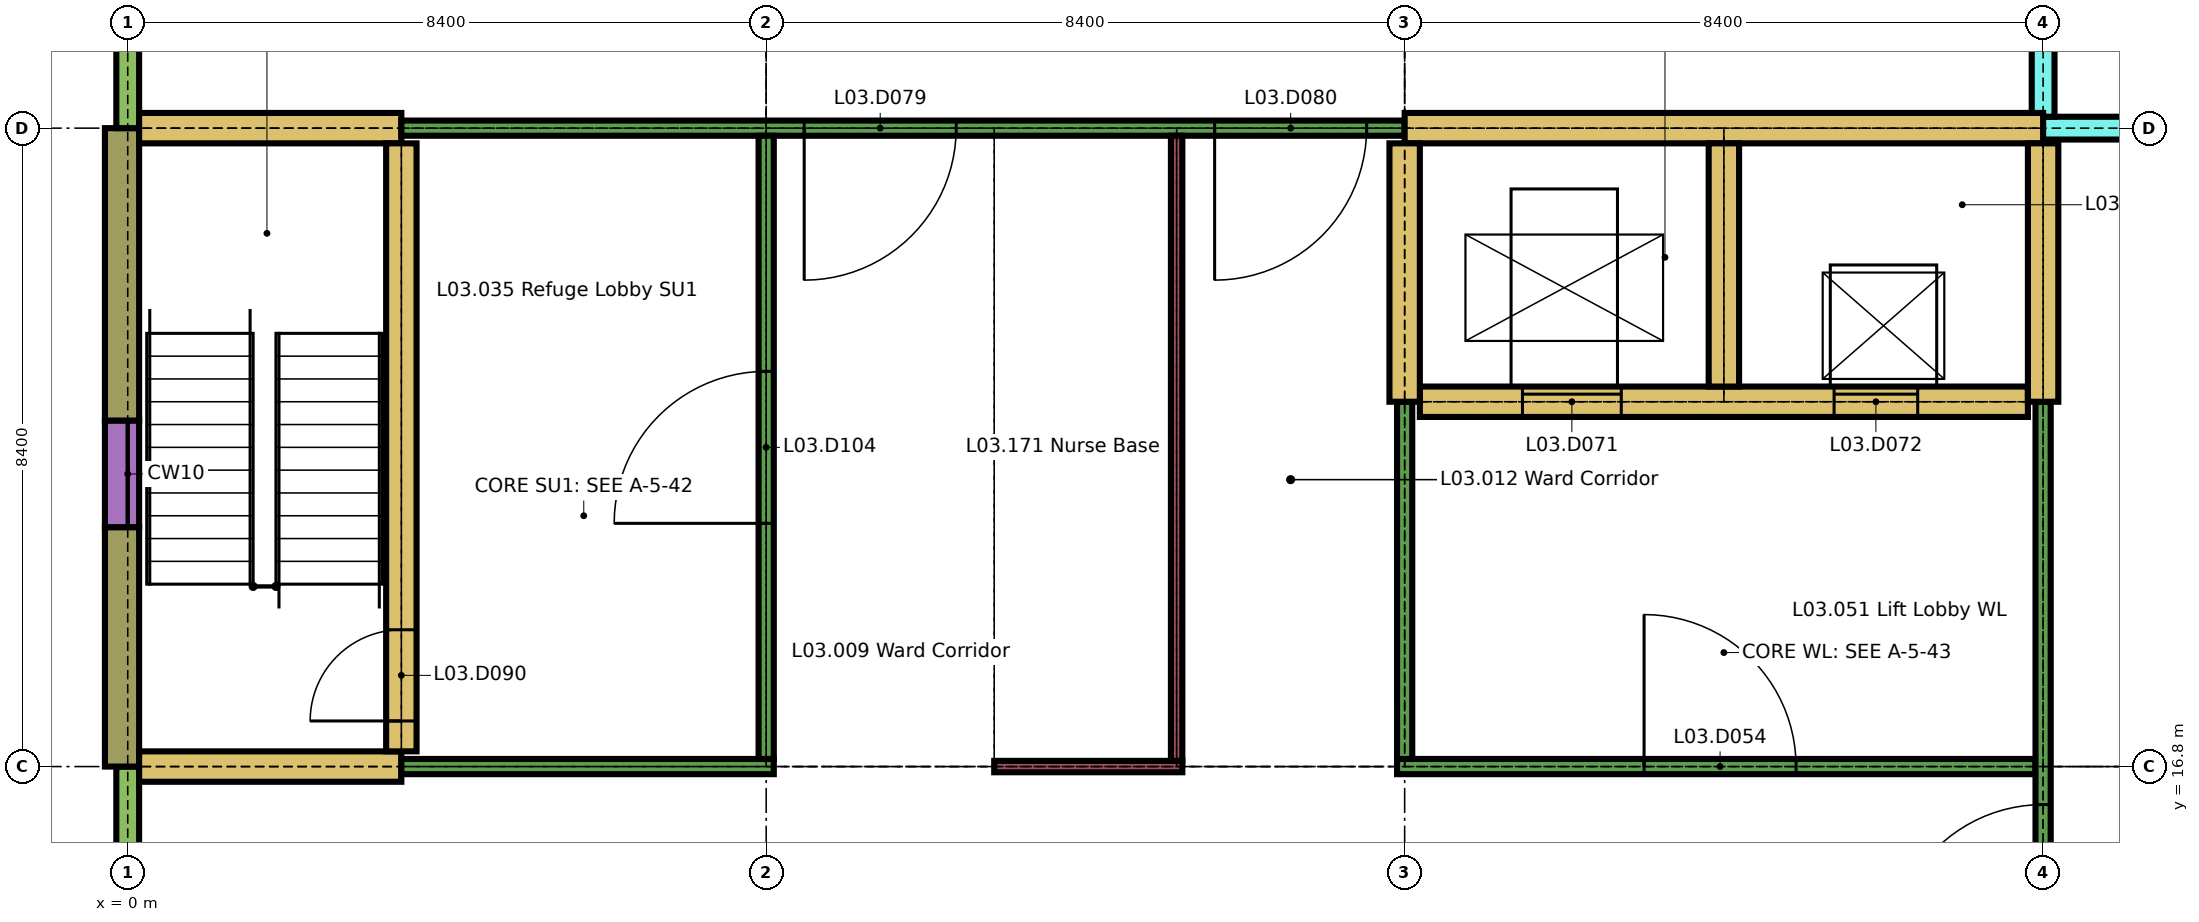
"""IFC4 building model, lengths in metres.
Left out: names, types, materials, properties, quantities, classifications, styles, units other than length and angle.
Written with IfcOpenShell. Run it as: python <this file> out.ifc"""

import sys

from ifc_helpers import new_model, si_unit, direction, frame, frame_2d, origin, place, context, subcontext, project, spatial, rectangle, extrude, element, fill, save


model = new_model("IFC4")
c1 = context("Model", 3, precision=1e-05, world=origin(), true_north=direction((0.0, 1.0)))
c2 = subcontext(c1, "Body", "Model", "MODEL_VIEW")
j1 = project(units=[si_unit("LENGTHUNIT", "METRE"), si_unit("PLANEANGLEUNIT", "RADIAN")], contexts=[c1])
p1 = place(None, origin())
s1 = spatial("IfcSite", under=j1, at=p1, CompositionType="ELEMENT")
p2 = place(p1, origin())
s2 = spatial("IfcBuilding", under=s1, at=p2, CompositionType="ELEMENT")
p3 = place(p2, frame((0.0, 0.0, 15.3)))
s3 = spatial("IfcBuildingStorey", under=s2, at=p3, CompositionType="ELEMENT", Elevation=15.3)
p4 = place(p3, frame((25.05, 25.2, 0.0), z_axis=(0.0, 0.0, 1.0), x_axis=(1.0, 0.0, 0.0)))
e1 = element("IfcWall", 1, at=p4, inside=s3, PredefinedType="SOLIDWALL", context=c2, shape_type="SweptSolid", body=[
    extrude(rectangle(XDim=8.2, YDim=0.3, at=frame_2d((4.1, 0.0))), origin(), (0.0, 0.0, 1.0), 3.26),
])
p5 = place(p4, frame((5.4, 0.0, 0.6)))
e2 = element("IfcOpeningElement", 2, at=p5, cuts=e1, PredefinedType="OPENING", context=c2, shape_type="SweptSolid", body=[
    extrude(rectangle(XDim=2.1, YDim=1.8, at=frame_2d((1.05, 0.9))), frame((0.0, 0.16, 0.0), z_axis=(0.0, -1.0, 0.0), x_axis=(1.0, 0.0, 0.0)), (0.0, 0.0, 1.0), 0.32),
])
p6 = place(p4, frame((3.275, 0.0, 0.0)))
e3 = element("IfcOpeningElement", 3, at=p6, cuts=e1, PredefinedType="OPENING", context=c2, shape_type="SweptSolid", body=[
    extrude(rectangle(XDim=1.8, YDim=2.4, at=frame_2d((0.9, 1.2))), frame((0.0, 0.16, 0.0), z_axis=(0.0, -1.0, 0.0), x_axis=(1.0, 0.0, 0.0)), (0.0, 0.0, 1.0), 0.32),
])
p7 = place(p3, frame((0.0, 13.8, 0.0), z_axis=(0.0, 0.0, 1.0), x_axis=(0.0, 1.0, 0.0)))
e4 = element("IfcWall", 4, at=p7, inside=s3, PredefinedType="SOLIDWALL", context=c2, shape_type="SweptSolid", body=[
    extrude(rectangle(XDim=3.0, YDim=0.3, at=frame_2d((1.5, 0.0))), origin(), (0.0, 0.0, 1.0), 2.96),
])
p8 = place(p7, frame((0.45, 0.0, 0.9)))
e5 = element("IfcOpeningElement", 5, at=p8, cuts=e4, PredefinedType="OPENING", context=c2, shape_type="SweptSolid", body=[
    extrude(rectangle(XDim=0.9, YDim=1.5, at=frame_2d((0.45, 0.75))), frame((0.0, 0.16, 0.0), z_axis=(0.0, -1.0, 0.0), x_axis=(1.0, 0.0, 0.0)), (0.0, 0.0, 1.0), 0.32),
])
p9 = place(p3, frame((-0.075, 16.8, 0.0), z_axis=(0.0, 0.0, 1.0), x_axis=(0.0, 1.0, 0.0)))
e6 = element("IfcWall", 6, at=p9, inside=s3, PredefinedType="SOLIDWALL", context=c2, shape_type="SweptSolid", body=[
    extrude(rectangle(XDim=3.15, YDim=0.45, at=frame_2d((1.575, 0.0))), origin(), (0.0, 0.0, 1.0), 3.26),
])
p10 = place(p3, frame((-0.075, 21.35, 0.0), z_axis=(0.0, 0.0, 1.0), x_axis=(0.0, 1.0, 0.0)))
e7 = element("IfcWall", 7, at=p10, inside=s3, PredefinedType="SOLIDWALL", context=c2, shape_type="SweptSolid", body=[
    extrude(rectangle(XDim=3.85, YDim=0.45, at=frame_2d((1.925, 0.0))), origin(), (0.0, 0.0, 1.0), 3.26),
])
p11 = place(p3, frame((-0.075, 19.95, 0.0), z_axis=(0.0, 0.0, 1.0), x_axis=(0.0, 1.0, 0.0)))
e8 = element("IfcWall", 8, at=p11, inside=s3, PredefinedType="SOLIDWALL", context=c2, shape_type="SweptSolid", body=[
    extrude(rectangle(XDim=1.4, YDim=0.45, at=frame_2d((0.7, 0.0))), origin(), (0.0, 0.0, 1.0), 0.6),
])
p12 = place(p3, frame((0.0, 25.2, 0.0), z_axis=(0.0, 0.0, 1.0), x_axis=(0.0, 1.0, 0.0)))
e9 = element("IfcWall", 9, at=p12, inside=s3, PredefinedType="SOLIDWALL", context=c2, shape_type="SweptSolid", body=[
    extrude(rectangle(XDim=1.3, YDim=0.3, at=frame_2d((0.65, 0.0))), origin(), (0.0, 0.0, 1.0), 2.96),
])
p13 = place(p3, frame((25.2, 25.35, 0.0), z_axis=(0.0, 0.0, 1.0), x_axis=(0.0, 1.0, 0.0)))
e10 = element("IfcWall", 10, at=p13, inside=s3, PredefinedType="SOLIDWALL", context=c2, shape_type="SweptSolid", body=[
    extrude(rectangle(XDim=7.9, YDim=0.3, at=frame_2d((3.95, 0.0))), origin(), (0.0, 0.0, 1.0), 3.26),
])
p14 = place(p13, frame((5.25, 0.0, 0.6)))
e11 = element("IfcOpeningElement", 11, at=p14, cuts=e10, PredefinedType="OPENING", context=c2, shape_type="SweptSolid", body=[
    extrude(rectangle(XDim=1.8, YDim=1.8, at=frame_2d((0.9, 0.9))), frame((0.0, 0.16, 0.0), z_axis=(0.0, -1.0, 0.0), x_axis=(1.0, 0.0, 0.0)), (0.0, 0.0, 1.0), 0.32),
])
p15 = place(p13, frame((3.075, 0.0, 0.0)))
e12 = element("IfcOpeningElement", 12, at=p15, cuts=e10, PredefinedType="OPENING", context=c2, shape_type="SweptSolid", body=[
    extrude(rectangle(XDim=1.8, YDim=2.4, at=frame_2d((0.9, 1.2))), frame((0.0, 0.16, 0.0), z_axis=(0.0, -1.0, 0.0), x_axis=(1.0, 0.0, 0.0)), (0.0, 0.0, 1.0), 0.32),
])
p16 = place(p3, frame((0.15, 16.8, 0.0), z_axis=(0.0, 0.0, 1.0), x_axis=(1.0, 0.0, 0.0)))
e13 = element("IfcWall", 13, at=p16, inside=s3, PredefinedType="SHEAR", context=c2, shape_type="SweptSolid", body=[
    extrude(rectangle(XDim=3.45, YDim=0.4, at=frame_2d((1.725, 0.0))), origin(), (0.0, 0.0, 1.0), 3.26),
])
p17 = place(p3, frame((3.6, 16.8, 0.0), z_axis=(0.0, 0.0, 1.0), x_axis=(1.0, 0.0, 0.0)))
e14 = element("IfcWall", 14, at=p17, inside=s3, PredefinedType="PARTITIONING", context=c2, shape_type="SweptSolid", body=[
    extrude(rectangle(XDim=4.9, YDim=0.2, at=frame_2d((2.45, 0.0))), origin(), (0.0, 0.0, 1.0), 3.26),
])
p18 = place(p3, frame((11.4, 16.8, 0.0), z_axis=(0.0, 0.0, 1.0), x_axis=(1.0, 0.0, 0.0)))
e15 = element("IfcWall", 15, at=p18, inside=s3, PredefinedType="PARTITIONING", context=c2, shape_type="SweptSolid", body=[
    extrude(rectangle(XDim=2.475, YDim=0.15, at=frame_2d((1.238, 0.0))), origin(), (0.0, 0.0, 1.0), 3.26),
])
p19 = place(p3, frame((16.7, 16.8, 0.0), z_axis=(0.0, 0.0, 1.0), x_axis=(1.0, 0.0, 0.0)))
e16 = element("IfcWall", 16, at=p19, inside=s3, PredefinedType="PARTITIONING", context=c2, shape_type="SweptSolid", body=[
    extrude(rectangle(XDim=8.4, YDim=0.2, at=frame_2d((4.2, 0.0))), origin(), (0.0, 0.0, 1.0), 3.26),
])
p20 = place(p19, frame((3.25, 0.0, 0.0)))
e17 = element("IfcOpeningElement", 17, at=p20, cuts=e16, PredefinedType="OPENING", context=c2, shape_type="SweptSolid", body=[
    extrude(rectangle(XDim=2.0, YDim=2.4, at=frame_2d((1.0, 1.2))), frame((0.0, 0.11, 0.0), z_axis=(0.0, -1.0, 0.0), x_axis=(1.0, 0.0, 0.0)), (0.0, 0.0, 1.0), 0.22),
])
p21 = place(p3, frame((17.0, 21.6, 0.0), z_axis=(0.0, 0.0, 1.0), x_axis=(1.0, 0.0, 0.0)))
e18 = element("IfcWall", 18, at=p21, inside=s3, PredefinedType="SHEAR", context=c2, shape_type="SweptSolid", body=[
    extrude(rectangle(XDim=8.0, YDim=0.4, at=frame_2d((4.0, 0.0))), origin(), (0.0, 0.0, 1.0), 3.26),
])
p22 = place(p21, frame((1.35, 0.0, 0.0)))
e19 = element("IfcOpeningElement", 19, at=p22, cuts=e18, PredefinedType="OPENING", context=c2, shape_type="SweptSolid", body=[
    extrude(rectangle(XDim=1.3, YDim=2.1, at=frame_2d((0.65, 1.05))), frame((0.0, 0.21, 0.0), z_axis=(0.0, -1.0, 0.0), x_axis=(1.0, 0.0, 0.0)), (0.0, 0.0, 1.0), 0.42),
])
p23 = place(p21, frame((5.45, 0.0, 0.0)))
e20 = element("IfcOpeningElement", 20, at=p23, cuts=e18, PredefinedType="OPENING", context=c2, shape_type="SweptSolid", body=[
    extrude(rectangle(XDim=1.1, YDim=2.1, at=frame_2d((0.55, 1.05))), frame((0.0, 0.21, 0.0), z_axis=(0.0, -1.0, 0.0), x_axis=(1.0, 0.0, 0.0)), (0.0, 0.0, 1.0), 0.42),
])
p24 = place(p3, frame((0.15, 25.2, 0.0), z_axis=(0.0, 0.0, 1.0), x_axis=(1.0, 0.0, 0.0)))
e21 = element("IfcWall", 21, at=p24, inside=s3, PredefinedType="SHEAR", context=c2, shape_type="SweptSolid", body=[
    extrude(rectangle(XDim=3.45, YDim=0.4, at=frame_2d((1.725, 0.0))), origin(), (0.0, 0.0, 1.0), 3.26),
])
p25 = place(p3, frame((3.6, 25.2, 0.0), z_axis=(0.0, 0.0, 1.0), x_axis=(1.0, 0.0, 0.0)))
e22 = element("IfcWall", 22, at=p25, inside=s3, PredefinedType="PARTITIONING", context=c2, shape_type="SweptSolid", body=[
    extrude(rectangle(XDim=13.2, YDim=0.2, at=frame_2d((6.6, 0.0))), origin(), (0.0, 0.0, 1.0), 3.26),
])
p26 = place(p25, frame((5.3, 0.0, 0.0)))
e23 = element("IfcOpeningElement", 23, at=p26, cuts=e22, PredefinedType="OPENING", context=c2, shape_type="SweptSolid", body=[
    extrude(rectangle(XDim=2.0, YDim=2.4, at=frame_2d((1.0, 1.2))), frame((0.0, 0.11, 0.0), z_axis=(0.0, -1.0, 0.0), x_axis=(1.0, 0.0, 0.0)), (0.0, 0.0, 1.0), 0.22),
])
p27 = place(p25, frame((10.7, 0.0, 0.0)))
e24 = element("IfcOpeningElement", 24, at=p27, cuts=e22, PredefinedType="OPENING", context=c2, shape_type="SweptSolid", body=[
    extrude(rectangle(XDim=2.0, YDim=2.4, at=frame_2d((1.0, 1.2))), frame((0.0, 0.11, 0.0), z_axis=(0.0, -1.0, 0.0), x_axis=(1.0, 0.0, 0.0)), (0.0, 0.0, 1.0), 0.22),
])
p28 = place(p3, frame((16.8, 25.2, 0.0), z_axis=(0.0, 0.0, 1.0), x_axis=(1.0, 0.0, 0.0)))
e25 = element("IfcWall", 25, at=p28, inside=s3, PredefinedType="SHEAR", context=c2, shape_type="SweptSolid", body=[
    extrude(rectangle(XDim=8.4, YDim=0.4, at=frame_2d((4.2, 0.0))), origin(), (0.0, 0.0, 1.0), 3.26),
])
p29 = place(p3, frame((3.6, 17.0, 0.0), z_axis=(0.0, 0.0, 1.0), x_axis=(0.0, 1.0, 0.0)))
e26 = element("IfcWall", 26, at=p29, inside=s3, PredefinedType="SHEAR", context=c2, shape_type="SweptSolid", body=[
    extrude(rectangle(XDim=8.0, YDim=0.4, at=frame_2d((4.0, 0.0))), origin(), (0.0, 0.0, 1.0), 3.26),
])
p30 = place(p29, frame((0.4, 0.0, 0.0)))
e27 = element("IfcOpeningElement", 27, at=p30, cuts=e26, PredefinedType="OPENING", context=c2, shape_type="SweptSolid", body=[
    extrude(rectangle(XDim=1.2, YDim=2.1, at=frame_2d((0.6, 1.05))), frame((0.0, 0.21, 0.0), z_axis=(0.0, -1.0, 0.0), x_axis=(1.0, 0.0, 0.0)), (0.0, 0.0, 1.0), 0.42),
])
p31 = place(p3, frame((8.4, 16.9, 0.0), z_axis=(0.0, 0.0, 1.0), x_axis=(0.0, 1.0, 0.0)))
e28 = element("IfcWall", 28, at=p31, inside=s3, PredefinedType="PARTITIONING", context=c2, shape_type="SweptSolid", body=[
    extrude(rectangle(XDim=8.2, YDim=0.2, at=frame_2d((4.1, 0.0))), origin(), (0.0, 0.0, 1.0), 3.26),
])
p32 = place(p31, frame((3.1, 0.0, 0.0)))
e29 = element("IfcOpeningElement", 29, at=p32, cuts=e28, PredefinedType="OPENING", context=c2, shape_type="SweptSolid", body=[
    extrude(rectangle(XDim=2.0, YDim=2.4, at=frame_2d((1.0, 1.2))), frame((0.0, 0.11, 0.0), z_axis=(0.0, -1.0, 0.0), x_axis=(1.0, 0.0, 0.0)), (0.0, 0.0, 1.0), 0.22),
])
p33 = place(p3, frame((13.8, 16.875, 0.0), z_axis=(0.0, 0.0, 1.0), x_axis=(0.0, 1.0, 0.0)))
e30 = element("IfcWall", 30, at=p33, inside=s3, PredefinedType="PARTITIONING", context=c2, shape_type="SweptSolid", body=[
    extrude(rectangle(XDim=8.225, YDim=0.15, at=frame_2d((4.113, 0.0))), origin(), (0.0, 0.0, 1.0), 3.26),
])
p34 = place(p3, frame((16.8, 16.9, 0.0), z_axis=(0.0, 0.0, 1.0), x_axis=(0.0, 1.0, 0.0)))
e31 = element("IfcWall", 31, at=p34, inside=s3, PredefinedType="PARTITIONING", context=c2, shape_type="SweptSolid", body=[
    extrude(rectangle(XDim=4.7, YDim=0.2, at=frame_2d((2.35, 0.0))), origin(), (0.0, 0.0, 1.0), 3.26),
])
p35 = place(p3, frame((16.8, 21.6, 0.0), z_axis=(0.0, 0.0, 1.0), x_axis=(0.0, 1.0, 0.0)))
e32 = element("IfcWall", 32, at=p35, inside=s3, PredefinedType="SHEAR", context=c2, shape_type="SweptSolid", body=[
    extrude(rectangle(XDim=3.4, YDim=0.4, at=frame_2d((1.7, 0.0))), origin(), (0.0, 0.0, 1.0), 3.26),
])
p36 = place(p3, frame((21.0, 21.8, 0.0), z_axis=(0.0, 0.0, 1.0), x_axis=(0.0, 1.0, 0.0)))
e33 = element("IfcWall", 33, at=p36, inside=s3, PredefinedType="SHEAR", context=c2, shape_type="SweptSolid", body=[
    extrude(rectangle(XDim=3.2, YDim=0.4, at=frame_2d((1.6, 0.0))), origin(), (0.0, 0.0, 1.0), 3.26),
])
p37 = place(p3, frame((25.2, 8.75, 0.0), z_axis=(0.0, 0.0, 1.0), x_axis=(0.0, 1.0, 0.0)))
e34 = element("IfcWall", 34, at=p37, inside=s3, PredefinedType="PARTITIONING", context=c2, shape_type="SweptSolid", body=[
    extrude(rectangle(XDim=12.85, YDim=0.2, at=frame_2d((6.425, 0.0))), origin(), (0.0, 0.0, 1.0), 3.26),
])
p38 = place(p37, frame((0.325, 0.0, 0.0)))
e35 = element("IfcOpeningElement", 35, at=p38, cuts=e34, PredefinedType="OPENING", context=c2, shape_type="SweptSolid", body=[
    extrude(rectangle(XDim=2.0, YDim=2.4, at=frame_2d((1.0, 1.2))), frame((0.0, 0.11, 0.0), z_axis=(0.0, -1.0, 0.0), x_axis=(1.0, 0.0, 0.0)), (0.0, 0.0, 1.0), 0.22),
])
p39 = place(p37, frame((5.55, 0.0, 0.0)))
e36 = element("IfcOpeningElement", 36, at=p39, cuts=e34, PredefinedType="OPENING", context=c2, shape_type="SweptSolid", body=[
    extrude(rectangle(XDim=2.0, YDim=2.4, at=frame_2d((1.0, 1.2))), frame((0.0, 0.11, 0.0), z_axis=(0.0, -1.0, 0.0), x_axis=(1.0, 0.0, 0.0)), (0.0, 0.0, 1.0), 0.22),
])
p40 = place(p3, frame((25.2, 21.6, 0.0), z_axis=(0.0, 0.0, 1.0), x_axis=(0.0, 1.0, 0.0)))
e37 = element("IfcWall", 37, at=p40, inside=s3, PredefinedType="SHEAR", context=c2, shape_type="SweptSolid", body=[
    extrude(rectangle(XDim=3.4, YDim=0.4, at=frame_2d((1.7, 0.0))), origin(), (0.0, 0.0, 1.0), 3.26),
])
p41 = place(p20, origin())
e38 = element("IfcDoor", 38, at=p41, inside=s3, OperationType="SINGLE_SWING_RIGHT", PredefinedType="DOOR", context=c2, shape_type="SweptSolid", body=[
    extrude(rectangle(XDim=2.0, YDim=2.4, at=frame_2d((1.0, 1.2))), frame((0.0, 0.03, 0.0), z_axis=(0.0, -1.0, 0.0), x_axis=(1.0, 0.0, 0.0)), (0.0, 0.0, 1.0), 0.06),
])
fill(e17, e38)
p42 = place(p22, origin())
e39 = element("IfcDoor", 39, at=p42, inside=s3, OperationType="SLIDING_TO_LEFT", PredefinedType="DOOR", context=c2, shape_type="SweptSolid", body=[
    extrude(rectangle(XDim=1.3, YDim=2.1, at=frame_2d((0.65, 1.05))), frame((0.0, 0.025, 0.0), z_axis=(0.0, -1.0, 0.0), x_axis=(1.0, 0.0, 0.0)), (0.0, 0.0, 1.0), 0.05),
])
fill(e19, e39)
p43 = place(p23, origin())
e40 = element("IfcDoor", 40, at=p43, inside=s3, OperationType="SLIDING_TO_LEFT", PredefinedType="DOOR", context=c2, shape_type="SweptSolid", body=[
    extrude(rectangle(XDim=1.1, YDim=2.1, at=frame_2d((0.55, 1.05))), frame((0.0, 0.025, 0.0), z_axis=(0.0, -1.0, 0.0), x_axis=(1.0, 0.0, 0.0)), (0.0, 0.0, 1.0), 0.05),
])
fill(e20, e40)
p44 = place(p26, origin())
e41 = element("IfcDoor", 41, at=p44, inside=s3, OperationType="SINGLE_SWING_LEFT", PredefinedType="DOOR", context=c2, shape_type="SweptSolid", body=[
    extrude(rectangle(XDim=2.0, YDim=2.4, at=frame_2d((1.0, 1.2))), frame((0.0, 0.03, 0.0), z_axis=(0.0, -1.0, 0.0), x_axis=(1.0, 0.0, 0.0)), (0.0, 0.0, 1.0), 0.06),
])
fill(e23, e41)
p45 = place(p27, origin())
e42 = element("IfcDoor", 42, at=p45, inside=s3, OperationType="SINGLE_SWING_LEFT", PredefinedType="DOOR", context=c2, shape_type="SweptSolid", body=[
    extrude(rectangle(XDim=2.0, YDim=2.4, at=frame_2d((1.0, 1.2))), frame((0.0, 0.03, 0.0), z_axis=(0.0, -1.0, 0.0), x_axis=(1.0, 0.0, 0.0)), (0.0, 0.0, 1.0), 0.06),
])
fill(e24, e42)
p46 = place(p30, origin())
e43 = element("IfcDoor", 43, at=p46, inside=s3, OperationType="SINGLE_SWING_RIGHT", PredefinedType="DOOR", context=c2, shape_type="SweptSolid", body=[
    extrude(rectangle(XDim=1.2, YDim=2.1, at=frame_2d((0.6, 1.05))), frame((0.0, 0.025, 0.0), z_axis=(0.0, -1.0, 0.0), x_axis=(1.0, 0.0, 0.0)), (0.0, 0.0, 1.0), 0.05),
])
fill(e27, e43)
p47 = place(p32, origin())
e44 = element("IfcDoor", 44, at=p47, inside=s3, OperationType="SINGLE_SWING_RIGHT", PredefinedType="DOOR", context=c2, shape_type="SweptSolid", body=[
    extrude(rectangle(XDim=2.0, YDim=2.4, at=frame_2d((1.0, 1.2))), frame((0.0, 0.03, 0.0), z_axis=(0.0, -1.0, 0.0), x_axis=(1.0, 0.0, 0.0)), (0.0, 0.0, 1.0), 0.06),
])
fill(e29, e44)
p48 = place(p39, origin())
e45 = element("IfcDoor", 45, at=p48, inside=s3, OperationType="SINGLE_SWING_RIGHT", PredefinedType="DOOR", context=c2, shape_type="SweptSolid", body=[
    extrude(rectangle(XDim=2.0, YDim=2.4, at=frame_2d((1.0, 1.2))), frame((0.0, 0.03, 0.0), z_axis=(0.0, -1.0, 0.0), x_axis=(1.0, 0.0, 0.0)), (0.0, 0.0, 1.0), 0.06),
])
fill(e36, e45)
save(model, sys.argv[1])
